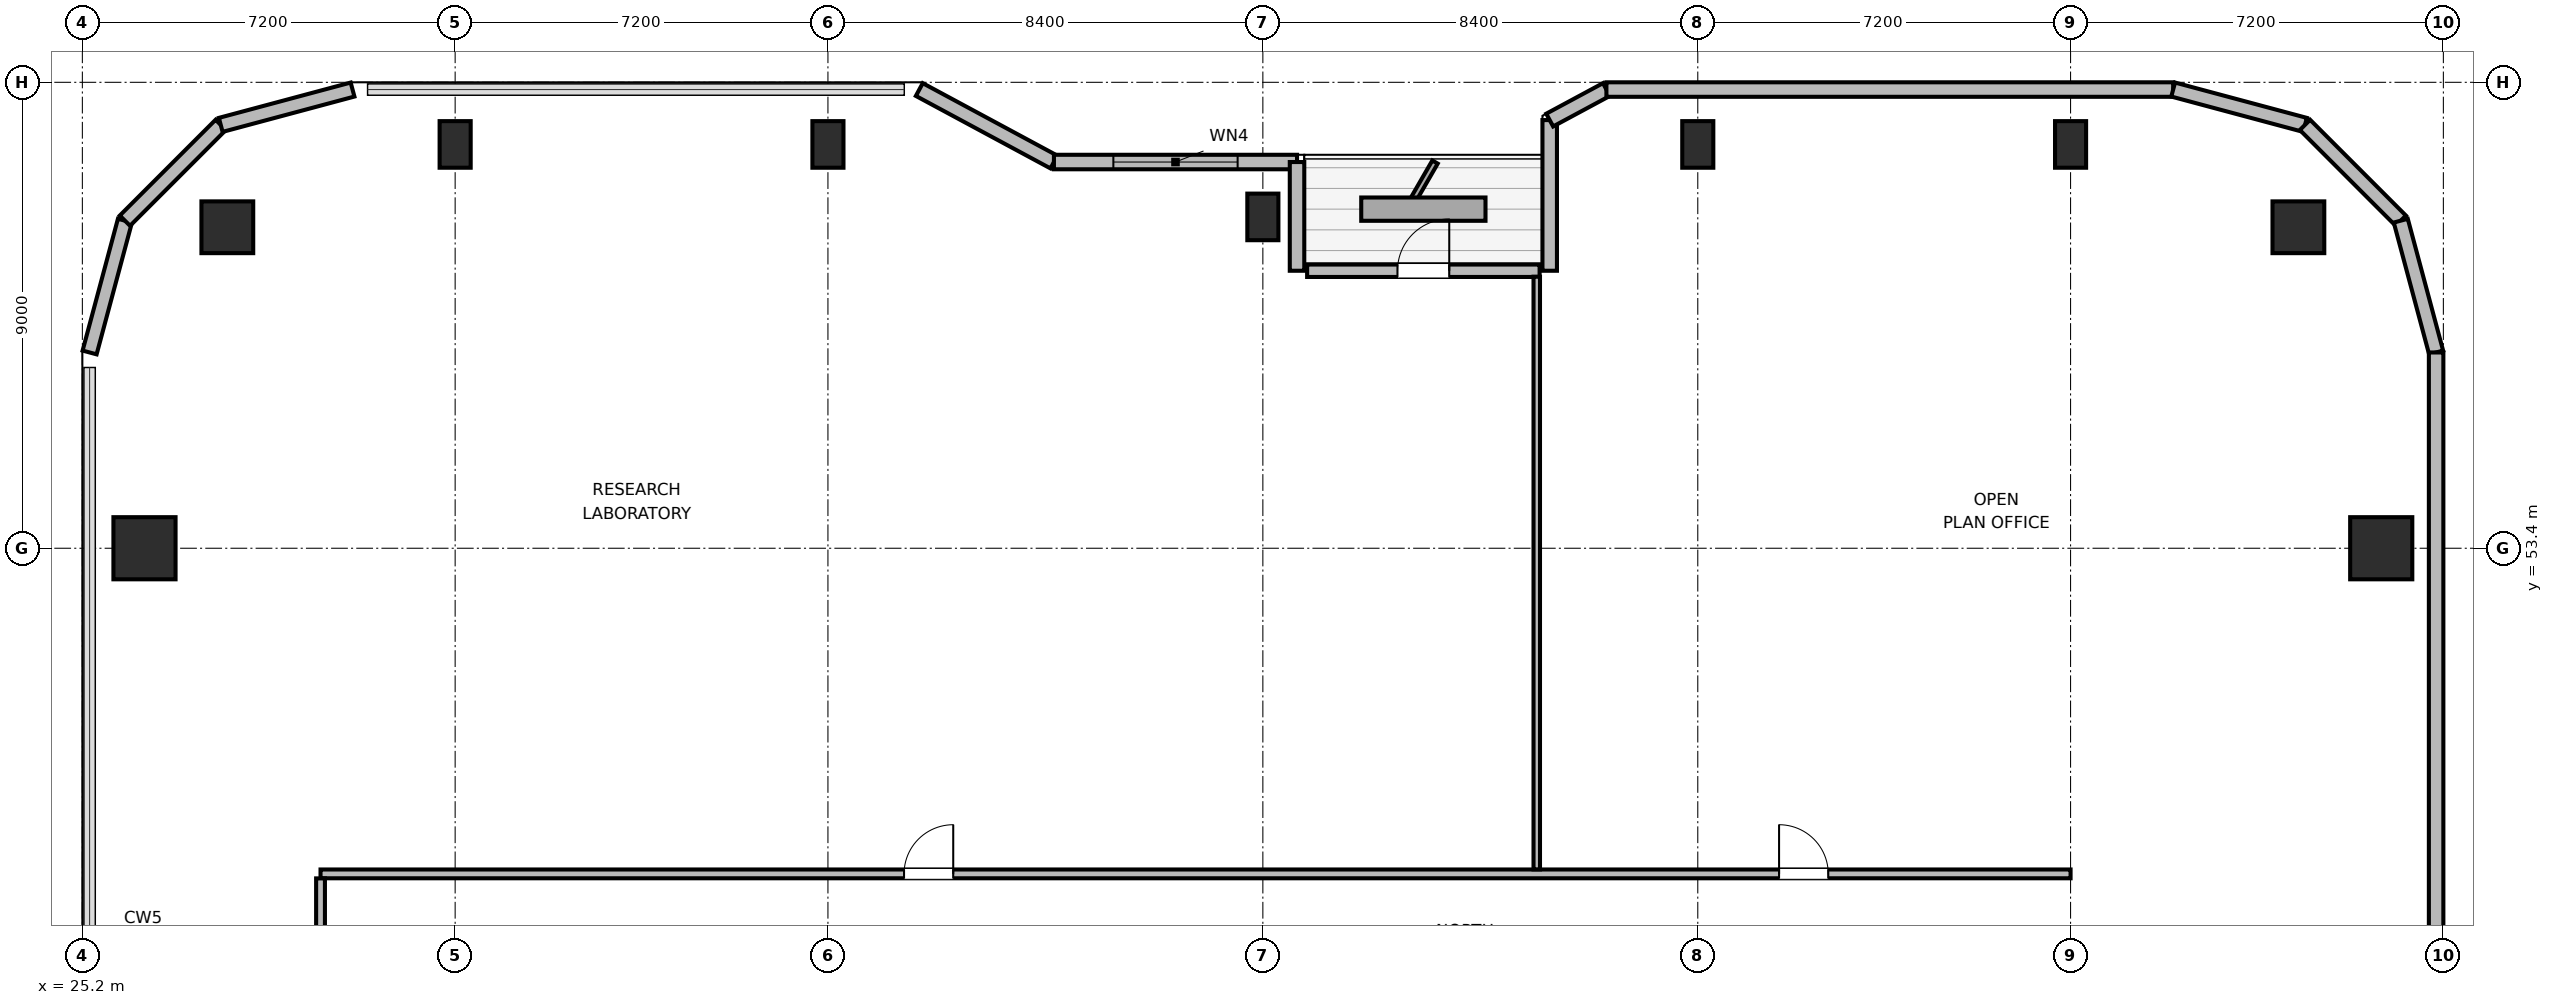
"""IFC4 building model, lengths in metres.
Left out: names, types, materials, properties, quantities, classifications, styles, units other than length and angle.
Written with IfcOpenShell. Run it as: python <this file> out.ifc"""

import sys

from ifc_helpers import new_model, si_unit, direction, frame, frame_2d, origin, origin_2d, place, context, subcontext, project, spatial, rectangle, circle, extrude, element, fill, save


model = new_model("IFC4")
c1 = context("Model", 3, precision=1e-05, world=origin(), true_north=direction((0.0, 1.0)))
c2 = subcontext(c1, "Body", "Model", "MODEL_VIEW")
j1 = project(units=[si_unit("LENGTHUNIT", "METRE"), si_unit("PLANEANGLEUNIT", "RADIAN")], contexts=[c1])
p1 = place(None, origin())
s1 = spatial("IfcSite", under=j1, at=p1, CompositionType="ELEMENT")
p2 = place(p1, origin())
s2 = spatial("IfcBuilding", under=s1, at=p2, CompositionType="ELEMENT")
p3 = place(p2, frame((0.0, 0.0, 214.8)))
s3 = spatial("IfcBuildingStorey", under=s2, at=p3, CompositionType="ELEMENT", Elevation=214.8)
for number, where, z_axis, x_axis in (
    (1, (68.0, 59.6, 0.0), (0.0, 0.0, 1.0), (1.0, 0.0, 0.0)),
    (2, (28.0, 59.6, 0.0), (0.0, 0.0, 1.0), (1.0, 0.0, 0.0)),
):
    element("IfcColumn", number, at=place(p3, frame(where, z_axis=z_axis, x_axis=x_axis)), inside=s3, PredefinedType="COLUMN", context=c2, shape_type="SweptSolid", body=[
        extrude(circle(Radius=0.5, at=origin_2d()), origin(), (0.0, 0.0, 1.0), 4.5),
    ])
for number, where, z_axis, x_axis in (
    (3, (32.4, 61.2, 0.0), (0.0, 0.0, 1.0), (1.0, 0.0, 0.0)),
    (4, (39.6, 61.2, 0.0), (0.0, 0.0, 1.0), (1.0, 0.0, 0.0)),
    (5, (48.0, 59.8, 0.0), (0.0, 0.0, 1.0), (1.0, 0.0, 0.0)),
    (6, (56.4, 61.2, 0.0), (0.0, 0.0, 1.0), (1.0, 0.0, 0.0)),
    (7, (63.6, 61.2, 0.0), (0.0, 0.0, 1.0), (1.0, 0.0, 0.0)),
):
    element("IfcColumn", number, at=place(p3, frame(where, z_axis=z_axis, x_axis=x_axis)), inside=s3, PredefinedType="COLUMN", context=c2, shape_type="SweptSolid", body=[
        extrude(rectangle(XDim=0.6, YDim=0.9, at=origin_2d()), origin(), (0.0, 0.0, 1.0), 4.5),
    ])
for number, where, z_axis, x_axis in (
    (8, (26.4, 53.4, 0.0), (0.0, 0.0, 1.0), (1.0, 0.0, 0.0)),
    (9, (69.6, 53.4, 0.0), (0.0, 0.0, 1.0), (1.0, 0.0, 0.0)),
):
    element("IfcColumn", number, at=place(p3, frame(where, z_axis=z_axis, x_axis=x_axis)), inside=s3, PredefinedType="COLUMN", context=c2, shape_type="SweptSolid", body=[
        extrude(rectangle(XDim=1.2, YDim=1.2, at=origin_2d()), origin(), (0.0, 0.0, 1.0), 4.5),
    ])
p4 = place(p3, frame((25.34, 57.182, 0.0), z_axis=(0.0, 0.0, 1.0), x_axis=(0.2588904131, 0.965906700466, 0.0)))
e10 = element("IfcWall", 10, at=p4, inside=s3, PredefinedType="SOLIDWALL", context=c2, shape_type="SweptSolid", body=[
    extrude(rectangle(XDim=2.636, YDim=0.28, at=frame_2d((1.318, 0.0))), origin(), (0.0, 0.0, 1.0), 4.28),
])
p5 = place(p3, frame((26.022, 59.728, 0.0), z_axis=(0.0, 0.0, 1.0), x_axis=(0.707153437963, 0.707060121331, 0.0)))
e11 = element("IfcWall", 11, at=p5, inside=s3, PredefinedType="SOLIDWALL", context=c2, shape_type="SweptSolid", body=[
    extrude(rectangle(XDim=2.616, YDim=0.28, at=frame_2d((1.308, 0.0))), origin(), (0.0, 0.0, 1.0), 4.28),
])
p6 = place(p3, frame((27.873, 61.577, 0.0), z_axis=(0.0, 0.0, 1.0), x_axis=(0.965883534663, 0.258976828051, 0.0)))
e12 = element("IfcWall", 12, at=p6, inside=s3, PredefinedType="SOLIDWALL", context=c2, shape_type="SweptSolid", body=[
    extrude(rectangle(XDim=2.636, YDim=0.28, at=frame_2d((1.318, 0.0))), origin(), (0.0, 0.0, 1.0), 4.28),
])
p7 = place(p3, frame((41.365, 62.26, 0.0), z_axis=(0.0, 0.0, 1.0), x_axis=(0.880473754814, -0.474094892488, 0.0)))
e13 = element("IfcWall", 13, at=p7, inside=s3, PredefinedType="SOLIDWALL", context=c2, shape_type="SweptSolid", body=[
    extrude(rectangle(XDim=2.953, YDim=0.28, at=frame_2d((1.477, 0.0))), origin(), (0.0, 0.0, 1.0), 2.865),
])
p8 = place(p3, frame((43.965, 60.86, 0.0), z_axis=(0.0, 0.0, 1.0), x_axis=(1.0, 0.0, 0.0)))
e14 = element("IfcWall", 14, at=p8, inside=s3, PredefinedType="SOLIDWALL", context=c2, shape_type="SweptSolid", body=[
    extrude(rectangle(XDim=4.695, YDim=0.28, at=frame_2d((2.348, 0.0))), origin(), (0.0, 0.0, 1.0), 2.865),
])
p9 = place(p8, frame((1.148, 0.0, 0.85)))
e15 = element("IfcOpeningElement", 15, at=p9, cuts=e14, PredefinedType="OPENING", context=c2, shape_type="SweptSolid", body=[
    extrude(rectangle(XDim=2.4, YDim=1.15, at=frame_2d((1.2, 0.575))), frame((0.0, 0.15, 0.0), z_axis=(0.0, -1.0, 0.0), x_axis=(1.0, 0.0, 0.0)), (0.0, 0.0, 1.0), 0.3),
])
p10 = place(p3, frame((48.66, 60.86, 0.0), z_axis=(0.0, 0.0, 1.0), x_axis=(0.0, -1.0, 0.0)))
e16 = element("IfcWall", 16, at=p10, inside=s3, PredefinedType="SOLIDWALL", context=c2, shape_type="SweptSolid", body=[
    extrude(rectangle(XDim=2.1, YDim=0.28, at=frame_2d((1.05, 0.0))), origin(), (0.0, 0.0, 1.0), 2.865),
])
p11 = place(p3, frame((48.855, 58.76, 0.0), z_axis=(0.0, 0.0, 1.0), x_axis=(1.0, 0.0, 0.0)))
e17 = element("IfcWall", 17, at=p11, inside=s3, PredefinedType="SOLIDWALL", context=c2, shape_type="SweptSolid", body=[
    extrude(rectangle(XDim=4.49, YDim=0.24, at=frame_2d((2.245, 0.0))), origin(), (0.0, 0.0, 1.0), 4.28),
])
p12 = place(p11, frame((1.745, 0.0, 0.0)))
e18 = element("IfcOpeningElement", 18, at=p12, cuts=e17, PredefinedType="OPENING", context=c2, shape_type="SweptSolid", body=[
    extrude(rectangle(XDim=1.0, YDim=2.02, at=frame_2d((0.5, 1.01))), frame((0.0, 0.13, 0.0), z_axis=(0.0, -1.0, 0.0), x_axis=(1.0, 0.0, 0.0)), (0.0, 0.0, 1.0), 0.26),
])
p13 = place(p3, frame((53.54, 58.76, 0.0), z_axis=(0.0, 0.0, 1.0), x_axis=(0.0, 1.0, 0.0)))
e19 = element("IfcWall", 19, at=p13, inside=s3, PredefinedType="SOLIDWALL", context=c2, shape_type="SweptSolid", body=[
    extrude(rectangle(XDim=2.91, YDim=0.28, at=frame_2d((1.455, 0.0))), origin(), (0.0, 0.0, 1.0), 2.865),
])
p14 = place(p3, frame((53.54, 61.67, 0.0), z_axis=(0.0, 0.0, 1.0), x_axis=(0.880515214249, 0.474017887296, 0.0)))
e20 = element("IfcWall", 20, at=p14, inside=s3, PredefinedType="SOLIDWALL", context=c2, shape_type="SweptSolid", body=[
    extrude(rectangle(XDim=1.244, YDim=0.28, at=frame_2d((0.622, 0.0))), origin(), (0.0, 0.0, 1.0), 4.28),
])
p15 = place(p3, frame((54.635, 62.26, 0.0), z_axis=(0.0, 0.0, 1.0), x_axis=(1.0, 0.0, 0.0)))
e21 = element("IfcWall", 21, at=p15, inside=s3, PredefinedType="SOLIDWALL", context=c2, shape_type="SweptSolid", body=[
    extrude(rectangle(XDim=10.946, YDim=0.28, at=frame_2d((5.473, 0.0))), origin(), (0.0, 0.0, 1.0), 4.28),
])
p16 = place(p3, frame((65.582, 62.26, 0.0), z_axis=(0.0, 0.0, 1.0), x_axis=(0.965883534663, -0.258976828051, 0.0)))
e22 = element("IfcWall", 22, at=p16, inside=s3, PredefinedType="SOLIDWALL", context=c2, shape_type="SweptSolid", body=[
    extrude(rectangle(XDim=2.636, YDim=0.28, at=frame_2d((1.318, 0.0))), origin(), (0.0, 0.0, 1.0), 4.28),
])
p17 = place(p3, frame((68.127, 61.577, 0.0), z_axis=(0.0, 0.0, 1.0), x_axis=(0.707153437963, -0.707060121331, 0.0)))
e23 = element("IfcWall", 23, at=p17, inside=s3, PredefinedType="SOLIDWALL", context=c2, shape_type="SweptSolid", body=[
    extrude(rectangle(XDim=2.616, YDim=0.28, at=frame_2d((1.308, 0.0))), origin(), (0.0, 0.0, 1.0), 4.28),
])
p18 = place(p3, frame((69.978, 59.728, 0.0), z_axis=(0.0, 0.0, 1.0), x_axis=(0.2588904131, -0.965906700466, 0.0)))
e24 = element("IfcWall", 24, at=p18, inside=s3, PredefinedType="SOLIDWALL", context=c2, shape_type="SweptSolid", body=[
    extrude(rectangle(XDim=2.636, YDim=0.28, at=frame_2d((1.318, 0.0))), origin(), (0.0, 0.0, 1.0), 4.28),
])
p19 = place(p3, frame((70.66, 57.182, 0.0), z_axis=(0.0, 0.0, 1.0), x_axis=(0.0, -1.0, 0.0)))
e25 = element("IfcWall", 25, at=p19, inside=s3, PredefinedType="SOLIDWALL", context=c2, shape_type="SweptSolid", body=[
    extrude(rectangle(XDim=14.442, YDim=0.28, at=frame_2d((7.221, 0.0))), origin(), (0.0, 0.0, 1.0), 4.28),
])
p20 = place(p3, frame((29.8, 47.11, 0.0), z_axis=(0.0, 0.0, 1.0), x_axis=(1.0, 0.0, 0.0)))
e26 = element("IfcWall", 26, at=p20, inside=s3, PredefinedType="PARTITIONING", context=c2, shape_type="SweptSolid", body=[
    extrude(rectangle(XDim=33.8, YDim=0.17, at=frame_2d((16.9, 0.0))), origin(), (0.0, 0.0, 1.0), 4.28),
])
p21 = place(p20, frame((11.27, 0.0, 0.0)))
e27 = element("IfcOpeningElement", 27, at=p21, cuts=e26, PredefinedType="OPENING", context=c2, shape_type="SweptSolid", body=[
    extrude(rectangle(XDim=0.95, YDim=2.04, at=frame_2d((0.475, 1.02))), frame((0.0, 0.095, 0.0), z_axis=(0.0, -1.0, 0.0), x_axis=(1.0, 0.0, 0.0)), (0.0, 0.0, 1.0), 0.19),
])
p22 = place(p20, frame((28.17, 0.0, 0.0)))
e28 = element("IfcOpeningElement", 28, at=p22, cuts=e26, PredefinedType="OPENING", context=c2, shape_type="SweptSolid", body=[
    extrude(rectangle(XDim=0.95, YDim=2.04, at=frame_2d((0.475, 1.02))), frame((0.0, 0.095, 0.0), z_axis=(0.0, -1.0, 0.0), x_axis=(1.0, 0.0, 0.0)), (0.0, 0.0, 1.0), 0.19),
])
p23 = place(p3, frame((29.8, 24.977, 0.0), z_axis=(0.0, 0.0, 1.0), x_axis=(0.0, 1.0, 0.0)))
e29 = element("IfcWall", 29, at=p23, inside=s3, PredefinedType="PARTITIONING", context=c2, shape_type="SweptSolid", body=[
    extrude(rectangle(XDim=22.046, YDim=0.17, at=frame_2d((11.023, 0.0))), origin(), (0.0, 0.0, 1.0), 4.28),
])
p24 = place(p23, frame((4.593, 0.0, 0.0)))
e30 = element("IfcOpeningElement", 30, at=p24, cuts=e29, PredefinedType="OPENING", context=c2, shape_type="SweptSolid", body=[
    extrude(rectangle(XDim=0.95, YDim=2.04, at=frame_2d((0.475, 1.02))), frame((0.0, 0.095, 0.0), z_axis=(0.0, -1.0, 0.0), x_axis=(1.0, 0.0, 0.0)), (0.0, 0.0, 1.0), 0.19),
])
p25 = place(p23, frame((15.703, 0.0, 0.0)))
e31 = element("IfcOpeningElement", 31, at=p25, cuts=e29, PredefinedType="OPENING", context=c2, shape_type="SweptSolid", body=[
    extrude(rectangle(XDim=0.95, YDim=2.04, at=frame_2d((0.475, 1.02))), frame((0.0, 0.095, 0.0), z_axis=(0.0, -1.0, 0.0), x_axis=(1.0, 0.0, 0.0)), (0.0, 0.0, 1.0), 0.19),
])
p26 = place(p3, frame((53.29, 47.197, 0.0), z_axis=(0.0, 0.0, 1.0), x_axis=(0.0, 1.0, 0.0)))
e32 = element("IfcWall", 32, at=p26, inside=s3, PredefinedType="PARTITIONING", context=c2, shape_type="SweptSolid", body=[
    extrude(rectangle(XDim=11.448, YDim=0.125, at=frame_2d((5.724, 0.0))), origin(), (0.0, 0.0, 1.0), 3.643),
])
p27 = place(p9, origin())
e33 = element("IfcWindow", 33, at=p27, inside=s3, PartitioningType="SINGLE_PANEL", PredefinedType="WINDOW", context=c2, shape_type="SweptSolid", body=[
    extrude(rectangle(XDim=2.4, YDim=1.15, at=frame_2d((1.2, 0.575))), frame((0.0, 0.03, 0.0), z_axis=(0.0, -1.0, 0.0), x_axis=(1.0, 0.0, 0.0)), (0.0, 0.0, 1.0), 0.06),
])
fill(e15, e33)
p28 = place(p12, origin())
e34 = element("IfcDoor", 34, at=p28, inside=s3, OperationType="SINGLE_SWING_RIGHT", PredefinedType="DOOR", context=c2, shape_type="SweptSolid", body=[
    extrude(rectangle(XDim=1.0, YDim=2.02, at=frame_2d((0.5, 1.01))), frame((0.0, 0.025, 0.0), z_axis=(0.0, -1.0, 0.0), x_axis=(1.0, 0.0, 0.0)), (0.0, 0.0, 1.0), 0.05),
])
fill(e18, e34)
p29 = place(p21, origin())
e35 = element("IfcDoor", 35, at=p29, inside=s3, OperationType="SINGLE_SWING_RIGHT", PredefinedType="DOOR", context=c2, shape_type="SweptSolid", body=[
    extrude(rectangle(XDim=0.95, YDim=2.04, at=frame_2d((0.475, 1.02))), frame((0.0, 0.025, 0.0), z_axis=(0.0, -1.0, 0.0), x_axis=(1.0, 0.0, 0.0)), (0.0, 0.0, 1.0), 0.05),
])
fill(e27, e35)
p30 = place(p22, origin())
e36 = element("IfcDoor", 36, at=p30, inside=s3, OperationType="SINGLE_SWING_LEFT", PredefinedType="DOOR", context=c2, shape_type="SweptSolid", body=[
    extrude(rectangle(XDim=0.95, YDim=2.04, at=frame_2d((0.475, 1.02))), frame((0.0, 0.025, 0.0), z_axis=(0.0, -1.0, 0.0), x_axis=(1.0, 0.0, 0.0)), (0.0, 0.0, 1.0), 0.05),
])
fill(e28, e36)
save(model, sys.argv[1])
